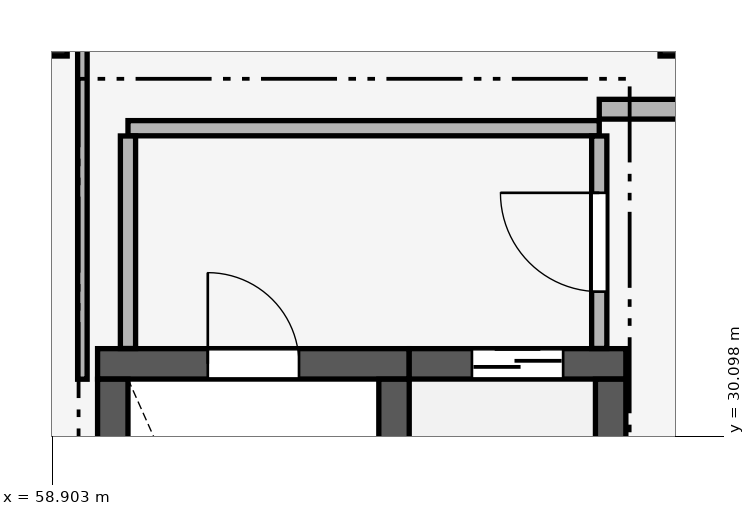
"""IFC4 building model, lengths in metres.
Left out: names, types, materials, properties, quantities, classifications, styles, units other than length and angle.
Written with IfcOpenShell. Run it as: python <this file> out.ifc"""

import sys

from ifc_helpers import new_model, si_unit, direction, frame, frame_2d, origin, origin_2d, place, context, subcontext, project, spatial, rectangle, extrude, element, fill, save


model = new_model("IFC4")
c1 = context("Model", 3, precision=1e-05, world=origin(), true_north=direction((0.0, 1.0)))
c2 = subcontext(c1, "Body", "Model", "MODEL_VIEW")
j1 = project(units=[si_unit("LENGTHUNIT", "METRE"), si_unit("PLANEANGLEUNIT", "RADIAN")], contexts=[c1])
p1 = place(None, origin())
s1 = spatial("IfcSite", under=j1, at=p1, CompositionType="ELEMENT")
p2 = place(p1, origin())
s2 = spatial("IfcBuilding", under=s1, at=p2, CompositionType="ELEMENT")
p3 = place(p2, frame((0.0, 0.0, 10.2)))
s3 = spatial("IfcBuildingStorey", under=s2, at=p3, CompositionType="ELEMENT", Elevation=10.2)
for number, where, z_axis, x_axis in (
    (1, (58.8, 35.4, 0.0), (0.0, 0.0, 1.0), (1.0, 0.0, 0.0)),
    (2, (67.2, 35.4, 0.0), (0.0, 0.0, 1.0), (1.0, 0.0, 0.0)),
):
    element("IfcColumn", number, at=place(p3, frame(where, z_axis=z_axis, x_axis=x_axis)), inside=s3, PredefinedType="COLUMN", context=c2, shape_type="SweptSolid", body=[
        extrude(rectangle(XDim=0.6, YDim=0.6, at=origin_2d()), origin(), (0.0, 0.0, 1.0), 5.1),
    ])
p4 = place(p3, frame((59.5, 31.05, 0.0), z_axis=(0.0, 0.0, 1.0), x_axis=(1.0, 0.0, 0.0)))
e3 = element("IfcWall", 3, at=p4, inside=s3, PredefinedType="SHEAR", context=c2, shape_type="SweptSolid", body=[
    extrude(rectangle(XDim=4.1, YDim=0.4, at=frame_2d((2.05, 0.0))), origin(), (0.0, 0.0, 1.0), 4.82),
])
p5 = place(p4, frame((1.45, 0.0, 0.0)))
e4 = element("IfcOpeningElement", 4, at=p5, cuts=e3, PredefinedType="OPENING", context=c2, shape_type="SweptSolid", body=[
    extrude(rectangle(XDim=1.2, YDim=2.2, at=frame_2d((0.6, 1.1))), frame((0.0, 0.215, 0.0), z_axis=(0.0, -1.0, 0.0), x_axis=(1.0, 0.0, 0.0)), (0.0, 0.0, 1.0), 0.43),
])
for number, where, z_axis, x_axis in (
    (5, (59.7, 23.452, 0.0), (0.0, 0.0, 1.0), (0.0, 1.0, 0.0)),
    (6, (63.4, 23.452, 0.0), (0.0, 0.0, 1.0), (0.0, 1.0, 0.0)),
):
    element("IfcWall", number, at=place(p3, frame(where, z_axis=z_axis, x_axis=x_axis)), inside=s3, PredefinedType="SHEAR", context=c2, shape_type="SweptSolid", body=[
        extrude(rectangle(XDim=7.396, YDim=0.4, at=frame_2d((3.698, 0.0))), origin(), (0.0, 0.0, 1.0), 4.82),
    ])
p6 = place(p3, frame((63.6, 31.05, 0.0), z_axis=(0.0, 0.0, 1.0), x_axis=(1.0, 0.0, 0.0)))
e7 = element("IfcWall", 7, at=p6, inside=s3, PredefinedType="SHEAR", context=c2, shape_type="SweptSolid", body=[
    extrude(rectangle(XDim=2.85, YDim=0.4, at=frame_2d((1.425, 0.0))), origin(), (0.0, 0.0, 1.0), 4.82),
])
p7 = place(p6, frame((0.825, 0.0, 0.0)))
e8 = element("IfcOpeningElement", 8, at=p7, cuts=e7, PredefinedType="OPENING", context=c2, shape_type="SweptSolid", body=[
    extrude(rectangle(XDim=1.2, YDim=2.15, at=frame_2d((0.6, 1.075))), frame((0.0, 0.215, 0.0), z_axis=(0.0, -1.0, 0.0), x_axis=(1.0, 0.0, 0.0)), (0.0, 0.0, 1.0), 0.43),
])
p8 = place(p3, frame((66.25, 28.052, 0.0), z_axis=(0.0, 0.0, 1.0), x_axis=(0.0, 1.0, 0.0)))
e9 = element("IfcWall", 9, at=p8, inside=s3, PredefinedType="SHEAR", context=c2, shape_type="SweptSolid", body=[
    extrude(rectangle(XDim=2.796, YDim=0.4, at=frame_2d((1.398, 0.0))), origin(), (0.0, 0.0, 1.0), 4.82),
])
p9 = place(p3, frame((59.9, 34.15, 0.0), z_axis=(0.0, 0.0, 1.0), x_axis=(1.0, 0.0, 0.0)))
e10 = element("IfcWall", 10, at=p9, inside=s3, PredefinedType="PARTITIONING", context=c2, shape_type="SweptSolid", body=[
    extrude(rectangle(XDim=6.2, YDim=0.2, at=frame_2d((3.1, 0.0))), origin(), (0.0, 0.0, 1.0), 4.82),
])
p10 = place(p3, frame((66.1, 34.4, 0.0), z_axis=(0.0, 0.0, 1.0), x_axis=(1.0, 0.0, 0.0)))
e11 = element("IfcWall", 11, at=p10, inside=s3, PredefinedType="PARTITIONING", context=c2, shape_type="SweptSolid", body=[
    extrude(rectangle(XDim=2.7, YDim=0.26, at=frame_2d((1.35, 0.0))), origin(), (0.0, 0.0, 1.0), 4.12),
])
p11 = place(p3, frame((59.3, 30.848, 0.0), z_axis=(0.0, 0.0, 1.0), x_axis=(0.0, 1.0, 0.0)))
e12 = element("IfcWall", 12, at=p11, inside=s3, PredefinedType="PARTITIONING", context=c2, shape_type="SweptSolid", body=[
    extrude(rectangle(XDim=4.38, YDim=0.125, at=frame_2d((2.19, 0.0))), origin(), (0.0, 0.0, 1.0), 4.12),
])
p12 = place(p3, frame((59.9, 31.252, 0.0), z_axis=(0.0, 0.0, 1.0), x_axis=(0.0, 1.0, 0.0)))
e13 = element("IfcWall", 13, at=p12, inside=s3, PredefinedType="PARTITIONING", context=c2, shape_type="SweptSolid", body=[
    extrude(rectangle(XDim=2.796, YDim=0.2, at=frame_2d((1.398, 0.0))), origin(), (0.0, 0.0, 1.0), 4.37),
])
p13 = place(p3, frame((66.1, 31.252, 0.0), z_axis=(0.0, 0.0, 1.0), x_axis=(0.0, 1.0, 0.0)))
e14 = element("IfcWall", 14, at=p13, inside=s3, PredefinedType="PARTITIONING", context=c2, shape_type="SweptSolid", body=[
    extrude(rectangle(XDim=2.796, YDim=0.2, at=frame_2d((1.398, 0.0))), origin(), (0.0, 0.0, 1.0), 4.37),
])
p14 = place(p13, frame((0.748, 0.0, 0.0)))
e15 = element("IfcOpeningElement", 15, at=p14, cuts=e14, PredefinedType="OPENING", context=c2, shape_type="SweptSolid", body=[
    extrude(rectangle(XDim=1.3, YDim=2.2, at=frame_2d((0.65, 1.1))), frame((0.0, 0.115, 0.0), z_axis=(0.0, -1.0, 0.0), x_axis=(1.0, 0.0, 0.0)), (0.0, 0.0, 1.0), 0.23),
])
p15 = place(p5, origin())
e16 = element("IfcDoor", 16, at=p15, inside=s3, OperationType="SINGLE_SWING_LEFT", PredefinedType="DOOR", context=c2, shape_type="SweptSolid", body=[
    extrude(rectangle(XDim=1.2, YDim=2.2, at=frame_2d((0.6, 1.1))), frame((0.0, 0.025, 0.0), z_axis=(0.0, -1.0, 0.0), x_axis=(1.0, 0.0, 0.0)), (0.0, 0.0, 1.0), 0.05),
])
fill(e4, e16)
p16 = place(p7, origin())
e17 = element("IfcDoor", 17, at=p16, inside=s3, OperationType="DOUBLE_DOOR_SLIDING", PredefinedType="DOOR", context=c2, shape_type="SweptSolid", body=[
    extrude(rectangle(XDim=1.2, YDim=2.15, at=frame_2d((0.6, 1.075))), frame((0.0, 0.025, 0.0), z_axis=(0.0, -1.0, 0.0), x_axis=(1.0, 0.0, 0.0)), (0.0, 0.0, 1.0), 0.05),
])
fill(e8, e17)
p17 = place(p14, origin())
e18 = element("IfcDoor", 18, at=p17, inside=s3, OperationType="SINGLE_SWING_RIGHT", PredefinedType="DOOR", context=c2, shape_type="SweptSolid", body=[
    extrude(rectangle(XDim=1.3, YDim=2.2, at=frame_2d((0.65, 1.1))), frame((0.0, 0.025, 0.0), z_axis=(0.0, -1.0, 0.0), x_axis=(1.0, 0.0, 0.0)), (0.0, 0.0, 1.0), 0.05),
])
fill(e15, e18)
save(model, sys.argv[1])
